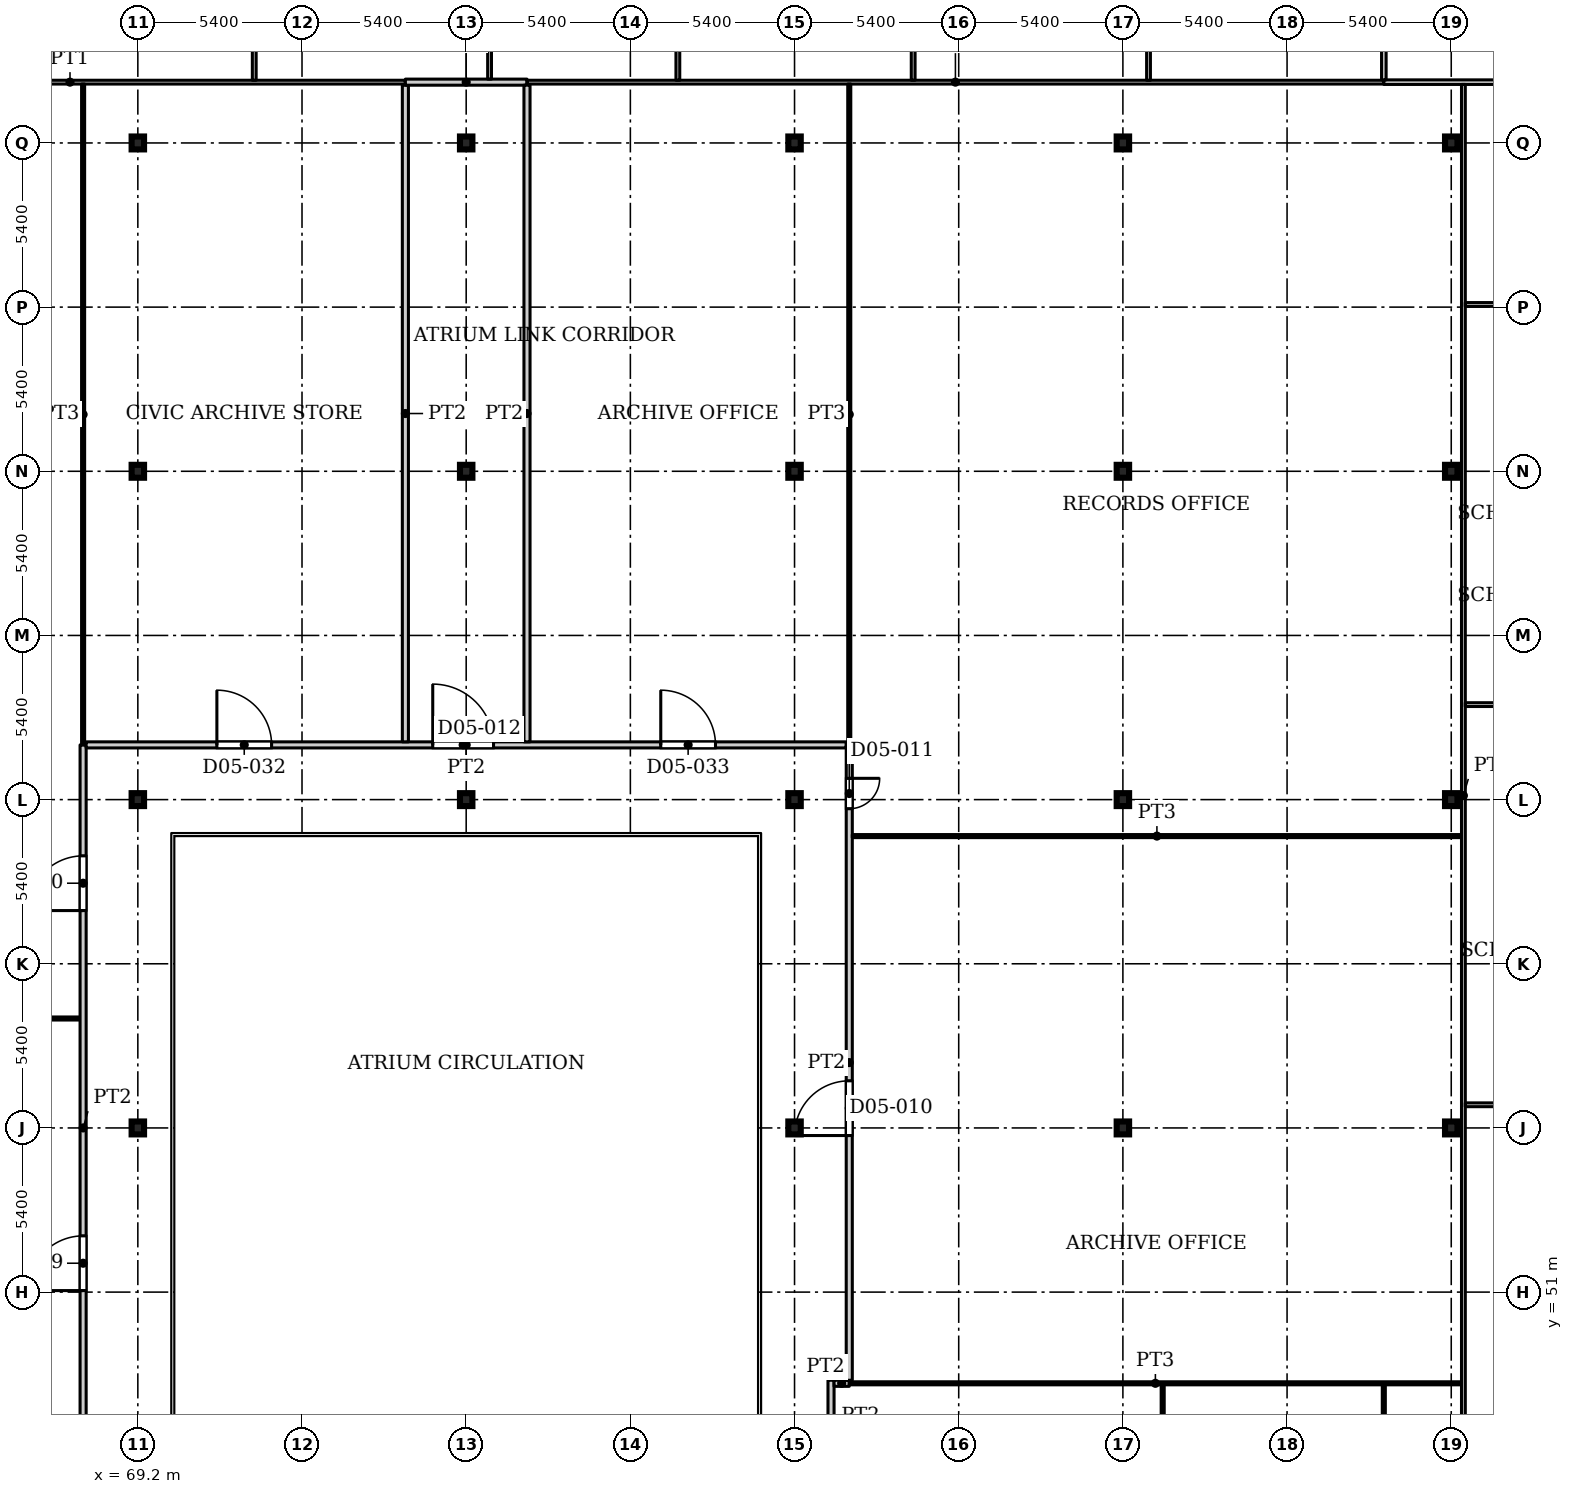
"""IFC4 building model, lengths in metres.
Left out: names, types, materials, properties, quantities, classifications, styles, units other than length and angle.
Written with IfcOpenShell. Run it as: python <this file> out.ifc"""

import sys

from ifc_helpers import new_model, si_unit, direction, frame, frame_2d, origin, origin_2d, place, context, subcontext, project, spatial, rectangle, i_section, extrude, source, transform, mapped, element, fill, save


model = new_model("IFC4")
c1 = context("Model", 3, precision=1e-05, world=origin(), true_north=direction((0.0, 1.0)))
c2 = subcontext(c1, "Body", "Model", "MODEL_VIEW")
j1 = project(units=[si_unit("LENGTHUNIT", "METRE"), si_unit("PLANEANGLEUNIT", "RADIAN")], contexts=[c1])
p1 = place(None, origin())
s1 = spatial("IfcSite", under=j1, at=p1, CompositionType="ELEMENT")
p2 = place(p1, origin())
s2 = spatial("IfcBuilding", under=s1, at=p2, CompositionType="ELEMENT")
p3 = place(p2, frame((0.0, 0.0, 26.0)))
s3 = spatial("IfcBuildingStorey", under=s2, at=p3, CompositionType="ELEMENT", Elevation=26.0)
for number, where, z_axis, x_axis in (
    (1, (69.2, 56.4, 0.0), (0.0, 0.0, 1.0), (1.0, 0.0, 0.0)),
    (2, (90.8, 56.4, 0.0), (0.0, 0.0, 1.0), (1.0, 0.0, 0.0)),
    (3, (101.6, 56.4, 0.0), (0.0, 0.0, 1.0), (1.0, 0.0, 0.0)),
    (4, (112.4, 56.4, 0.0), (0.0, 0.0, 1.0), (1.0, 0.0, 0.0)),
    (5, (69.2, 67.2, 0.0), (0.0, 0.0, 1.0), (1.0, 0.0, 0.0)),
    (6, (80.0, 67.2, 0.0), (0.0, 0.0, 1.0), (1.0, 0.0, 0.0)),
    (7, (90.8, 67.2, 0.0), (0.0, 0.0, 1.0), (1.0, 0.0, 0.0)),
    (8, (101.6, 67.2, 0.0), (0.0, 0.0, 1.0), (1.0, 0.0, 0.0)),
    (9, (112.4, 67.2, 0.0), (0.0, 0.0, 1.0), (1.0, 0.0, 0.0)),
    (10, (69.2, 78.0, 0.0), (0.0, 0.0, 1.0), (1.0, 0.0, 0.0)),
    (11, (80.0, 78.0, 0.0), (0.0, 0.0, 1.0), (1.0, 0.0, 0.0)),
    (12, (90.8, 78.0, 0.0), (0.0, 0.0, 1.0), (1.0, 0.0, 0.0)),
    (13, (101.6, 78.0, 0.0), (0.0, 0.0, 1.0), (1.0, 0.0, 0.0)),
    (14, (112.4, 78.0, 0.0), (0.0, 0.0, 1.0), (1.0, 0.0, 0.0)),
    (15, (69.2, 88.8, 0.0), (0.0, 0.0, 1.0), (1.0, 0.0, 0.0)),
    (16, (80.0, 88.8, 0.0), (0.0, 0.0, 1.0), (1.0, 0.0, 0.0)),
    (17, (90.8, 88.8, 0.0), (0.0, 0.0, 1.0), (1.0, 0.0, 0.0)),
    (18, (101.6, 88.8, 0.0), (0.0, 0.0, 1.0), (1.0, 0.0, 0.0)),
    (19, (112.4, 88.8, 0.0), (0.0, 0.0, 1.0), (1.0, 0.0, 0.0)),
):
    element("IfcColumn", number, at=place(p3, frame(where, z_axis=z_axis, x_axis=x_axis)), inside=s3, PredefinedType="COLUMN", context=c2, shape_type="SweptSolid", body=[
        extrude(i_section(OverallWidth=0.409, OverallDepth=0.425, WebThickness=0.033, FlangeThickness=0.052, FilletRadius=0.013, at=origin_2d()), origin(), (0.0, 0.0, 1.0), 4.5),
    ])
p4 = place(p3, frame((33.45, 60.0, 0.0), z_axis=(0.0, 0.0, 1.0), x_axis=(1.0, 0.0, 0.0)))
e20 = element("IfcWall", 20, at=p4, inside=s3, PredefinedType="PARTITIONING", context=c2, shape_type="SweptSolid", body=[
    extrude(rectangle(XDim=33.85, YDim=0.1, at=frame_2d((16.925, 0.0))), origin(), (0.0, 0.0, 1.0), 4.2),
])
p5 = place(p3, frame((55.938, 90.8, 0.0), z_axis=(0.0, 0.0, 1.0), x_axis=(1.0, 0.0, 0.0)))
e21 = element("IfcWall", 21, at=p5, inside=s3, PredefinedType="PARTITIONING", context=c2, shape_type="SweptSolid", body=[
    extrude(rectangle(XDim=22.062, YDim=0.125, at=frame_2d((11.031, 0.0))), origin(), (0.0, 0.0, 1.0), 4.2),
])
p6 = place(p3, frame((67.4, 43.8, 0.0), z_axis=(0.0, 0.0, 1.0), x_axis=(0.0, 1.0, 0.0)))
e22 = element("IfcWall", 22, at=p6, inside=s3, PredefinedType="PARTITIONING", context=c2, shape_type="SweptSolid", body=[
    extrude(rectangle(XDim=25.2, YDim=0.2, at=frame_2d((12.6, 0.0))), origin(), (0.0, 0.0, 1.0), 4.2),
])
p7 = place(p6, frame((7.25, 0.0, 0.0)))
e23 = element("IfcOpeningElement", 23, at=p7, cuts=e22, PredefinedType="OPENING", context=c2, shape_type="SweptSolid", body=[
    extrude(rectangle(XDim=1.8, YDim=2.1, at=frame_2d((0.9, 1.05))), frame((0.0, 0.11, 0.0), z_axis=(0.0, -1.0, 0.0), x_axis=(1.0, 0.0, 0.0)), (0.0, 0.0, 1.0), 0.22),
])
p8 = place(p6, frame((19.75, 0.0, 0.0)))
e24 = element("IfcOpeningElement", 24, at=p8, cuts=e22, PredefinedType="OPENING", context=c2, shape_type="SweptSolid", body=[
    extrude(rectangle(XDim=1.8, YDim=2.1, at=frame_2d((0.9, 1.05))), frame((0.0, 0.11, 0.0), z_axis=(0.0, -1.0, 0.0), x_axis=(1.0, 0.0, 0.0)), (0.0, 0.0, 1.0), 0.22),
])
p9 = place(p3, frame((67.4, 69.0, 0.0), z_axis=(0.0, 0.0, 1.0), x_axis=(0.0, 1.0, 0.0)))
e25 = element("IfcWall", 25, at=p9, inside=s3, PredefinedType="PARTITIONING", context=c2, shape_type="SweptSolid", body=[
    extrude(rectangle(XDim=21.738, YDim=0.1, at=frame_2d((10.869, 0.0))), origin(), (0.0, 0.0, 1.0), 4.2),
])
p10 = place(p3, frame((67.5, 69.0, 0.0), z_axis=(0.0, 0.0, 1.0), x_axis=(1.0, 0.0, 0.0)))
e26 = element("IfcWall", 26, at=p10, inside=s3, PredefinedType="PARTITIONING", context=c2, shape_type="SweptSolid", body=[
    extrude(rectangle(XDim=25.0, YDim=0.2, at=frame_2d((12.5, 0.0))), origin(), (0.0, 0.0, 1.0), 4.2),
])
p11 = place(p10, frame((11.4, 0.0, 0.0)))
e27 = element("IfcOpeningElement", 27, at=p11, cuts=e26, PredefinedType="OPENING", context=c2, shape_type="SweptSolid", body=[
    extrude(rectangle(XDim=2.0, YDim=2.1, at=frame_2d((1.0, 1.05))), frame((0.0, 0.11, 0.0), z_axis=(0.0, -1.0, 0.0), x_axis=(1.0, 0.0, 0.0)), (0.0, 0.0, 1.0), 0.22),
])
p12 = place(p10, frame((4.3, 0.0, 0.0)))
e28 = element("IfcOpeningElement", 28, at=p12, cuts=e26, PredefinedType="OPENING", context=c2, shape_type="SweptSolid", body=[
    extrude(rectangle(XDim=1.8, YDim=2.1, at=frame_2d((0.9, 1.05))), frame((0.0, 0.11, 0.0), z_axis=(0.0, -1.0, 0.0), x_axis=(1.0, 0.0, 0.0)), (0.0, 0.0, 1.0), 0.22),
])
p13 = place(p10, frame((18.9, 0.0, 0.0)))
e29 = element("IfcOpeningElement", 29, at=p13, cuts=e26, PredefinedType="OPENING", context=c2, shape_type="SweptSolid", body=[
    extrude(rectangle(XDim=1.8, YDim=2.1, at=frame_2d((0.9, 1.05))), frame((0.0, 0.11, 0.0), z_axis=(0.0, -1.0, 0.0), x_axis=(1.0, 0.0, 0.0)), (0.0, 0.0, 1.0), 0.22),
])
p14 = place(p3, frame((73.029, 90.862, 0.0), z_axis=(0.0, 0.0, 1.0), x_axis=(0.0, 1.0, 0.0)))
e30 = element("IfcWall", 30, at=p14, inside=s3, PredefinedType="PARTITIONING", context=c2, shape_type="SweptSolid", body=[
    extrude(rectangle(XDim=8.238, YDim=0.125, at=frame_2d((4.119, 0.0))), origin(), (0.0, 0.0, 1.0), 4.2),
])
p15 = place(p3, frame((78.0, 69.1, 0.0), z_axis=(0.0, 0.0, 1.0), x_axis=(0.0, 1.0, 0.0)))
e31 = element("IfcWall", 31, at=p15, inside=s3, PredefinedType="PARTITIONING", context=c2, shape_type="SweptSolid", body=[
    extrude(rectangle(XDim=21.6, YDim=0.2, at=frame_2d((10.8, 0.0))), origin(), (0.0, 0.0, 1.0), 4.2),
])
p16 = place(p3, frame((78.0, 90.8, 0.0), z_axis=(0.0, 0.0, 1.0), x_axis=(1.0, 0.0, 0.0)))
e32 = element("IfcWall", 32, at=p16, inside=s3, PredefinedType="PARTITIONING", context=c2, shape_type="SweptSolid", body=[
    extrude(rectangle(XDim=4.0, YDim=0.2, at=frame_2d((2.0, 0.0))), origin(), (0.0, 0.0, 1.0), 4.2),
])
p17 = place(p3, frame((80.769, 90.9, 0.0), z_axis=(0.0, 0.0, 1.0), x_axis=(0.0, 1.0, 0.0)))
e33 = element("IfcWall", 33, at=p17, inside=s3, PredefinedType="PARTITIONING", context=c2, shape_type="SweptSolid", body=[
    extrude(rectangle(XDim=8.2, YDim=0.125, at=frame_2d((4.1, 0.0))), origin(), (0.0, 0.0, 1.0), 4.2),
])
p18 = place(p3, frame((82.0, 69.1, 0.0), z_axis=(0.0, 0.0, 1.0), x_axis=(0.0, 1.0, 0.0)))
e34 = element("IfcWall", 34, at=p18, inside=s3, PredefinedType="PARTITIONING", context=c2, shape_type="SweptSolid", body=[
    extrude(rectangle(XDim=21.6, YDim=0.2, at=frame_2d((10.8, 0.0))), origin(), (0.0, 0.0, 1.0), 4.2),
])
p19 = place(p3, frame((82.0, 90.8, 0.0), z_axis=(0.0, 0.0, 1.0), x_axis=(1.0, 0.0, 0.0)))
e35 = element("IfcWall", 35, at=p19, inside=s3, PredefinedType="PARTITIONING", context=c2, shape_type="SweptSolid", body=[
    extrude(rectangle(XDim=28.183, YDim=0.125, at=frame_2d((14.092, 0.0))), origin(), (0.0, 0.0, 1.0), 4.2),
])
p20 = place(p3, frame((86.962, 90.862, 0.0), z_axis=(0.0, 0.0, 1.0), x_axis=(0.0, 1.0, 0.0)))
e36 = element("IfcWall", 36, at=p20, inside=s3, PredefinedType="PARTITIONING", context=c2, shape_type="SweptSolid", body=[
    extrude(rectangle(XDim=8.238, YDim=0.125, at=frame_2d((4.119, 0.0))), origin(), (0.0, 0.0, 1.0), 4.2),
])
p21 = place(p3, frame((92.0, 43.8, 0.0), z_axis=(0.0, 0.0, 1.0), x_axis=(0.0, 1.0, 0.0)))
e37 = element("IfcWall", 37, at=p21, inside=s3, PredefinedType="PARTITIONING", context=c2, shape_type="SweptSolid", body=[
    extrude(rectangle(XDim=4.3, YDim=0.2, at=frame_2d((2.15, 0.0))), origin(), (0.0, 0.0, 1.0), 4.2),
])
p22 = place(p3, frame((92.1, 48.0, 0.0), z_axis=(0.0, 0.0, 1.0), x_axis=(1.0, 0.0, 0.0)))
e38 = element("IfcWall", 38, at=p22, inside=s3, PredefinedType="PARTITIONING", context=c2, shape_type="SweptSolid", body=[
    extrude(rectangle(XDim=0.5, YDim=0.2, at=frame_2d((0.25, 0.0))), origin(), (0.0, 0.0, 1.0), 4.2),
])
p23 = place(p3, frame((92.6, 48.0, 0.0), z_axis=(0.0, 0.0, 1.0), x_axis=(1.0, 0.0, 0.0)))
e39 = element("IfcWall", 39, at=p23, inside=s3, PredefinedType="PARTITIONING", context=c2, shape_type="SweptSolid", body=[
    extrude(rectangle(XDim=20.138, YDim=0.1, at=frame_2d((10.069, 0.0))), origin(), (0.0, 0.0, 1.0), 4.2),
])
p24 = place(p3, frame((92.6, 48.1, 0.0), z_axis=(0.0, 0.0, 1.0), x_axis=(0.0, 1.0, 0.0)))
e40 = element("IfcWall", 40, at=p24, inside=s3, PredefinedType="PARTITIONING", context=c2, shape_type="SweptSolid", body=[
    extrude(rectangle(XDim=20.9, YDim=0.2, at=frame_2d((10.45, 0.0))), origin(), (0.0, 0.0, 1.0), 4.2),
])
p25 = place(p24, frame((8.05, 0.0, 0.0)))
e41 = element("IfcOpeningElement", 41, at=p25, cuts=e40, PredefinedType="OPENING", context=c2, shape_type="SweptSolid", body=[
    extrude(rectangle(XDim=1.8, YDim=2.1, at=frame_2d((0.9, 1.05))), frame((0.0, 0.11, 0.0), z_axis=(0.0, -1.0, 0.0), x_axis=(1.0, 0.0, 0.0)), (0.0, 0.0, 1.0), 0.22),
])
p26 = place(p24, frame((18.8, 0.0, 0.0)))
e42 = element("IfcOpeningElement", 42, at=p26, cuts=e40, PredefinedType="OPENING", context=c2, shape_type="SweptSolid", body=[
    extrude(rectangle(XDim=1.0, YDim=2.1, at=frame_2d((0.5, 1.05))), frame((0.0, 0.11, 0.0), z_axis=(0.0, -1.0, 0.0), x_axis=(1.0, 0.0, 0.0)), (0.0, 0.0, 1.0), 0.22),
])
p27 = place(p3, frame((92.6, 69.0, 0.0), z_axis=(0.0, 0.0, 1.0), x_axis=(0.0, 1.0, 0.0)))
e43 = element("IfcWall", 43, at=p27, inside=s3, PredefinedType="PARTITIONING", context=c2, shape_type="SweptSolid", body=[
    extrude(rectangle(XDim=21.738, YDim=0.1, at=frame_2d((10.869, 0.0))), origin(), (0.0, 0.0, 1.0), 4.2),
])
p28 = place(p3, frame((92.7, 66.0, 0.0), z_axis=(0.0, 0.0, 1.0), x_axis=(1.0, 0.0, 0.0)))
e44 = element("IfcWall", 44, at=p28, inside=s3, PredefinedType="PARTITIONING", context=c2, shape_type="SweptSolid", body=[
    extrude(rectangle(XDim=20.038, YDim=0.1, at=frame_2d((10.019, 0.0))), origin(), (0.0, 0.0, 1.0), 4.2),
])
for number, where, z_axis, x_axis in (
    (45, (94.702, 90.862, 0.0), (0.0, 0.0, 1.0), (0.0, 1.0, 0.0)),
    (46, (102.443, 90.862, 0.0), (0.0, 0.0, 1.0), (0.0, 1.0, 0.0)),
):
    element("IfcWall", number, at=place(p3, frame(where, z_axis=z_axis, x_axis=x_axis)), inside=s3, PredefinedType="PARTITIONING", context=c2, shape_type="SweptSolid", body=[
        extrude(rectangle(XDim=8.238, YDim=0.125, at=frame_2d((4.119, 0.0))), origin(), (0.0, 0.0, 1.0), 4.2),
    ])
for number, where, z_axis, x_axis in (
    (47, (102.909, 35.3, 0.0), (0.0, 0.0, 1.0), (0.0, 1.0, 0.0)),
    (48, (110.182, 35.3, 0.0), (0.0, 0.0, 1.0), (0.0, 1.0, 0.0)),
):
    element("IfcWall", number, at=place(p3, frame(where, z_axis=z_axis, x_axis=x_axis)), inside=s3, PredefinedType="PARTITIONING", context=c2, shape_type="SweptSolid", body=[
        extrude(rectangle(XDim=12.65, YDim=0.1, at=frame_2d((6.325, 0.0))), origin(), (0.0, 0.0, 1.0), 4.2),
    ])
p29 = place(p3, frame((110.183, 90.8, 0.0), z_axis=(0.0, 0.0, 1.0), x_axis=(1.0, 0.0, 0.0)))
e49 = element("IfcWall", 49, at=p29, inside=s3, PredefinedType="PARTITIONING", context=c2, shape_type="SweptSolid", body=[
    extrude(rectangle(XDim=10.321, YDim=0.15, at=frame_2d((5.16, 0.0))), origin(), (0.0, 0.0, 1.0), 4.2),
])
p30 = place(p3, frame((110.183, 90.875, 0.0), z_axis=(0.0, 0.0, 1.0), x_axis=(0.0, 1.0, 0.0)))
e50 = element("IfcWall", 50, at=p30, inside=s3, PredefinedType="PARTITIONING", context=c2, shape_type="SweptSolid", body=[
    extrude(rectangle(XDim=8.225, YDim=0.15, at=frame_2d((4.113, 0.0))), origin(), (0.0, 0.0, 1.0), 4.2),
])
p31 = place(p3, frame((112.8, 43.938, 0.0), z_axis=(0.0, 0.0, 1.0), x_axis=(0.0, 1.0, 0.0)))
e51 = element("IfcWall", 51, at=p31, inside=s3, PredefinedType="PARTITIONING", context=c2, shape_type="SweptSolid", body=[
    extrude(rectangle(XDim=46.787, YDim=0.125, at=frame_2d((23.394, 0.0))), origin(), (0.0, 0.0, 1.0), 4.2),
])
p32 = place(p3, frame((112.862, 57.162, 0.0), z_axis=(0.0, 0.0, 1.0), x_axis=(1.0, 0.0, 0.0)))
e52 = element("IfcWall", 52, at=p32, inside=s3, PredefinedType="PARTITIONING", context=c2, shape_type="SweptSolid", body=[
    extrude(rectangle(XDim=8.238, YDim=0.125, at=frame_2d((4.119, 0.0))), origin(), (0.0, 0.0, 1.0), 4.2),
])
p33 = place(p3, frame((112.862, 70.325, 0.0), z_axis=(0.0, 0.0, 1.0), x_axis=(1.0, 0.0, 0.0)))
e53 = element("IfcWall", 53, at=p33, inside=s3, PredefinedType="PARTITIONING", context=c2, shape_type="SweptSolid", body=[
    extrude(rectangle(XDim=5.514, YDim=0.125, at=frame_2d((2.757, 0.0))), origin(), (0.0, 0.0, 1.0), 4.2),
])
p34 = place(p3, frame((112.862, 83.487, 0.0), z_axis=(0.0, 0.0, 1.0), x_axis=(1.0, 0.0, 0.0)))
e54 = element("IfcWall", 54, at=p34, inside=s3, PredefinedType="PARTITIONING", context=c2, shape_type="SweptSolid", body=[
    extrude(rectangle(XDim=8.238, YDim=0.125, at=frame_2d((4.119, 0.0))), origin(), (0.0, 0.0, 1.0), 4.2),
])
m1 = source(origin(), c2, "Body", "SweptSolid", [
    extrude(rectangle(XDim=1.8, YDim=2.1, at=frame_2d((0.9, 1.05))), frame((0.0, 0.025, 0.0), z_axis=(0.0, -1.0, 0.0), x_axis=(1.0, 0.0, 0.0)), (0.0, 0.0, 1.0), 0.05),
])
p35 = place(p25, origin())
e55 = element("IfcDoor", 55, at=p35, inside=s3, OperationType="DOUBLE_DOOR_SINGLE_SWING", PredefinedType="DOOR", context=c2, shape_type="MappedRepresentation", body=[
    mapped(m1, transform((0.0, 0.0, 0.0), x_axis=(1.0, 0.0, 0.0), y_axis=(0.0, 1.0, 0.0), z_axis=(0.0, 0.0, 1.0), scale=1.0)),
])
fill(e41, e55)
m2 = source(origin(), c2, "Body", "SweptSolid", [
    extrude(rectangle(XDim=1.0, YDim=2.1, at=frame_2d((0.5, 1.05))), frame((0.0, 0.025, 0.0), z_axis=(0.0, -1.0, 0.0), x_axis=(1.0, 0.0, 0.0)), (0.0, 0.0, 1.0), 0.05),
])
p36 = place(p26, origin())
e56 = element("IfcDoor", 56, at=p36, inside=s3, OperationType="SINGLE_SWING_RIGHT", PredefinedType="DOOR", context=c2, shape_type="MappedRepresentation", body=[
    mapped(m2, transform((0.0, 0.0, 0.0), x_axis=(1.0, 0.0, 0.0), y_axis=(0.0, 1.0, 0.0), z_axis=(0.0, 0.0, 1.0), scale=1.0)),
])
fill(e42, e56)
m3 = source(origin(), c2, "Body", "SweptSolid", [
    extrude(rectangle(XDim=2.0, YDim=2.1, at=frame_2d((1.0, 1.05))), frame((0.0, 0.025, 0.0), z_axis=(0.0, -1.0, 0.0), x_axis=(1.0, 0.0, 0.0)), (0.0, 0.0, 1.0), 0.05),
])
p37 = place(p11, origin())
e57 = element("IfcDoor", 57, at=p37, inside=s3, OperationType="DOUBLE_DOOR_SINGLE_SWING", PredefinedType="DOOR", context=c2, shape_type="MappedRepresentation", body=[
    mapped(m3, transform((0.0, 0.0, 0.0), x_axis=(1.0, 0.0, 0.0), y_axis=(0.0, 1.0, 0.0), z_axis=(0.0, 0.0, 1.0), scale=1.0)),
])
fill(e27, e57)
p38 = place(p12, origin())
e58 = element("IfcDoor", 58, at=p38, inside=s3, OperationType="DOUBLE_DOOR_SINGLE_SWING", PredefinedType="DOOR", context=c2, shape_type="MappedRepresentation", body=[
    mapped(m1, transform((0.0, 0.0, 0.0), x_axis=(1.0, 0.0, 0.0), y_axis=(0.0, 1.0, 0.0), z_axis=(0.0, 0.0, 1.0), scale=1.0)),
])
fill(e28, e58)
p39 = place(p13, origin())
e59 = element("IfcDoor", 59, at=p39, inside=s3, OperationType="DOUBLE_DOOR_SINGLE_SWING", PredefinedType="DOOR", context=c2, shape_type="MappedRepresentation", body=[
    mapped(m1, transform((0.0, 0.0, 0.0), x_axis=(1.0, 0.0, 0.0), y_axis=(0.0, 1.0, 0.0), z_axis=(0.0, 0.0, 1.0), scale=1.0)),
])
fill(e29, e59)
p40 = place(p7, origin())
e60 = element("IfcDoor", 60, at=p40, inside=s3, OperationType="DOUBLE_DOOR_SINGLE_SWING", PredefinedType="DOOR", context=c2, shape_type="MappedRepresentation", body=[
    mapped(m1, transform((0.0, 0.0, 0.0), x_axis=(1.0, 0.0, 0.0), y_axis=(0.0, 1.0, 0.0), z_axis=(0.0, 0.0, 1.0), scale=1.0)),
])
fill(e23, e60)
p41 = place(p8, origin())
e61 = element("IfcDoor", 61, at=p41, inside=s3, OperationType="DOUBLE_DOOR_SINGLE_SWING", PredefinedType="DOOR", context=c2, shape_type="MappedRepresentation", body=[
    mapped(m1, transform((0.0, 0.0, 0.0), x_axis=(1.0, 0.0, 0.0), y_axis=(0.0, 1.0, 0.0), z_axis=(0.0, 0.0, 1.0), scale=1.0)),
])
fill(e24, e61)
save(model, sys.argv[1])
